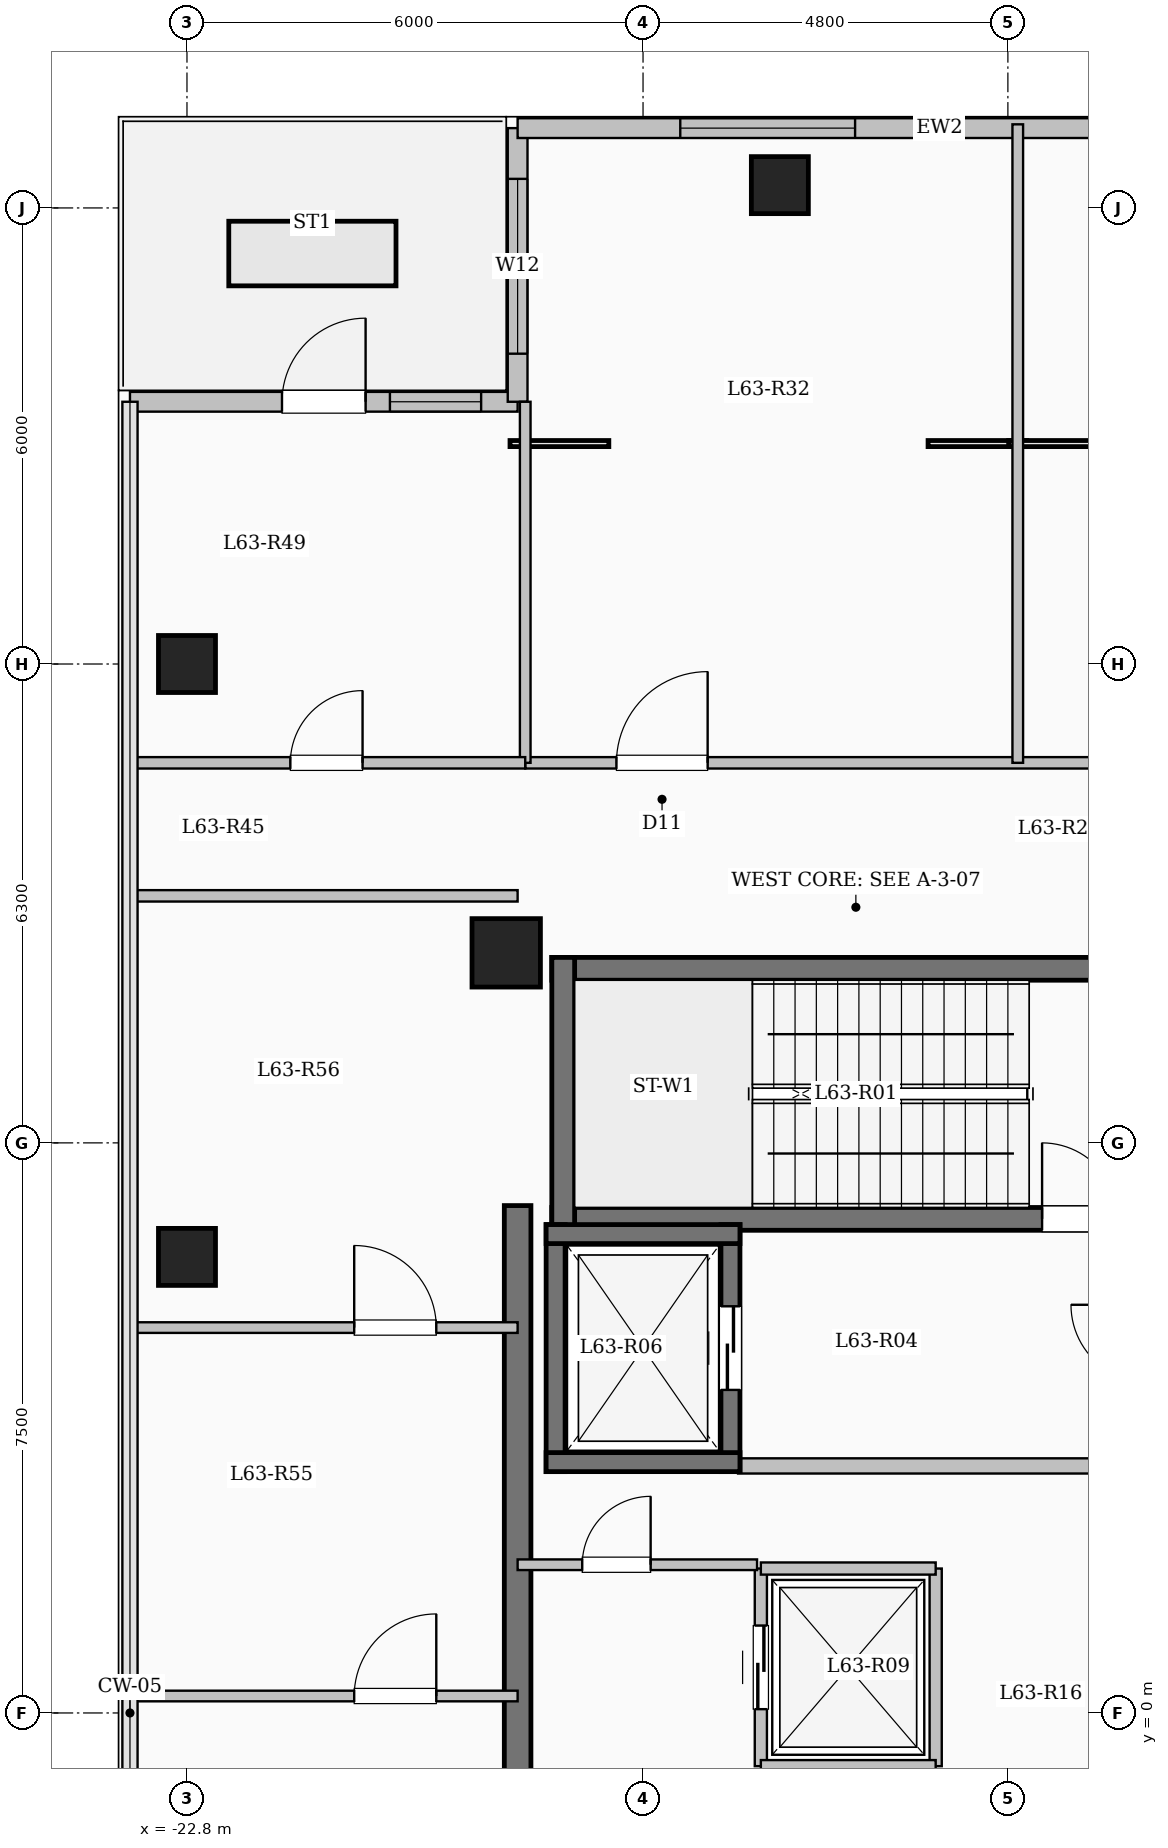
"""IFC4 building model, lengths in metres.
Left out: names, types, materials, properties, quantities, classifications, styles, units other than length and angle.
Written with IfcOpenShell. Run it as: python <this file> out.ifc"""

import sys

from ifc_helpers import new_model, si_unit, direction, frame, frame_2d, origin, origin_2d, place, context, subcontext, project, spatial, rectangle, extrude, element, fill, save


model = new_model("IFC4")
c1 = context("Model", 3, precision=1e-05, world=origin(), true_north=direction((0.0, 1.0)))
c2 = subcontext(c1, "Body", "Model", "MODEL_VIEW")
j1 = project(units=[si_unit("LENGTHUNIT", "METRE"), si_unit("PLANEANGLEUNIT", "RADIAN")], contexts=[c1])
p1 = place(None, origin())
s1 = spatial("IfcSite", under=j1, at=p1, CompositionType="ELEMENT")
p2 = place(p1, origin())
s2 = spatial("IfcBuilding", under=s1, at=p2, CompositionType="ELEMENT")
p3 = place(p2, frame((0.0, 0.0, 231.75)))
s3 = spatial("IfcBuildingStorey", under=s2, at=p3, CompositionType="ELEMENT", Elevation=231.75)
p4 = place(p3, frame((-18.6, 10.0, 0.0), z_axis=(0.0, 0.0, 1.0), x_axis=(1.0, 0.0, 0.0)))
e1 = element("IfcColumn", 1, at=p4, inside=s3, PredefinedType="COLUMN", context=c2, shape_type="SweptSolid", body=[
    extrude(rectangle(XDim=0.9, YDim=0.9, at=origin_2d()), origin(), (0.0, 0.0, 1.0), 4.65),
])
for number, where, z_axis, x_axis in (
    (2, (-15.0, 20.1, 0.0), (0.0, 0.0, 1.0), (1.0, 0.0, 0.0)),
    (3, (-22.8, 6.0, 0.0), (0.0, 0.0, 1.0), (1.0, 0.0, 0.0)),
    (4, (-22.8, 13.8, 0.0), (0.0, 0.0, 1.0), (1.0, 0.0, 0.0)),
):
    element("IfcColumn", number, at=place(p3, frame(where, z_axis=z_axis, x_axis=x_axis)), inside=s3, PredefinedType="COLUMN", context=c2, shape_type="SweptSolid", body=[
        extrude(rectangle(XDim=0.75, YDim=0.75, at=origin_2d()), origin(), (0.0, 0.0, 1.0), 4.65),
    ])
p5 = place(p3, frame((-23.55, 17.25, 0.0), z_axis=(0.0, 0.0, 1.0), x_axis=(1.0, 0.0, 0.0)))
e5 = element("IfcWall", 5, at=p5, inside=s3, PredefinedType="SOLIDWALL", context=c2, shape_type="SweptSolid", body=[
    extrude(rectangle(XDim=5.1, YDim=0.26, at=frame_2d((2.55, 0.0))), origin(), (0.0, 0.0, 1.0), 4.35),
])
p6 = place(p5, frame((2.0, 0.0, 0.0)))
e6 = element("IfcOpeningElement", 6, at=p6, cuts=e5, PredefinedType="OPENING", context=c2, shape_type="SweptSolid", body=[
    extrude(rectangle(XDim=1.1, YDim=2.2, at=frame_2d((0.55, 1.1))), frame((0.0, 0.14, 0.0), z_axis=(0.0, -1.0, 0.0), x_axis=(1.0, 0.0, 0.0)), (0.0, 0.0, 1.0), 0.28),
])
p7 = place(p5, frame((3.42, 0.0, 0.95)))
e7 = element("IfcOpeningElement", 7, at=p7, cuts=e5, PredefinedType="OPENING", context=c2, shape_type="SweptSolid", body=[
    extrude(rectangle(XDim=1.2, YDim=1.5, at=frame_2d((0.6, 0.75))), frame((0.0, 0.14, 0.0), z_axis=(0.0, -1.0, 0.0), x_axis=(1.0, 0.0, 0.0)), (0.0, 0.0, 1.0), 0.28),
])
p8 = place(p3, frame((-18.45, 17.25, 0.0), z_axis=(0.0, 0.0, 1.0), x_axis=(0.0, 1.0, 0.0)))
e8 = element("IfcWall", 8, at=p8, inside=s3, PredefinedType="SOLIDWALL", context=c2, shape_type="SweptSolid", body=[
    extrude(rectangle(XDim=3.6, YDim=0.26, at=frame_2d((1.8, 0.0))), origin(), (0.0, 0.0, 1.0), 4.35),
])
p9 = place(p8, frame((0.633, 0.0, 0.85)))
e9 = element("IfcOpeningElement", 9, at=p9, cuts=e8, PredefinedType="OPENING", context=c2, shape_type="SweptSolid", body=[
    extrude(rectangle(XDim=2.3, YDim=2.2, at=frame_2d((1.15, 1.1))), frame((0.0, 0.14, 0.0), z_axis=(0.0, -1.0, 0.0), x_axis=(1.0, 0.0, 0.0)), (0.0, 0.0, 1.0), 0.28),
])
p10 = place(p3, frame((-18.45, 20.85, 0.0), z_axis=(0.0, 0.0, 1.0), x_axis=(1.0, 0.0, 0.0)))
e10 = element("IfcWall", 10, at=p10, inside=s3, PredefinedType="SOLIDWALL", context=c2, shape_type="SweptSolid", body=[
    extrude(rectangle(XDim=11.1, YDim=0.26, at=frame_2d((5.55, 0.0))), origin(), (0.0, 0.0, 1.0), 4.35),
])
p11 = place(p10, frame((2.14, 0.0, 0.85)))
e11 = element("IfcOpeningElement", 11, at=p11, cuts=e10, PredefinedType="OPENING", context=c2, shape_type="SweptSolid", body=[
    extrude(rectangle(XDim=2.3, YDim=2.2, at=frame_2d((1.15, 1.1))), frame((0.0, 0.14, 0.0), z_axis=(0.0, -1.0, 0.0), x_axis=(1.0, 0.0, 0.0)), (0.0, 0.0, 1.0), 0.28),
])
p12 = place(p10, frame((7.765, 0.0, 0.85)))
e12 = element("IfcOpeningElement", 12, at=p12, cuts=e10, PredefinedType="OPENING", context=c2, shape_type="SweptSolid", body=[
    extrude(rectangle(XDim=2.3, YDim=2.2, at=frame_2d((1.15, 1.1))), frame((0.0, 0.14, 0.0), z_axis=(0.0, -1.0, 0.0), x_axis=(1.0, 0.0, 0.0)), (0.0, 0.0, 1.0), 0.28),
])
p13 = place(p3, frame((-18.0, 9.79, 0.0), z_axis=(0.0, 0.0, 1.0), x_axis=(1.0, 0.0, 0.0)))
e13 = element("IfcWall", 13, at=p13, inside=s3, PredefinedType="SHEAR", context=c2, shape_type="SweptSolid", body=[
    extrude(rectangle(XDim=8.0, YDim=0.3, at=frame_2d((4.0, 0.0))), origin(), (0.0, 0.0, 1.0), 4.65),
])
p14 = place(p3, frame((-18.0, 6.5, 0.0), z_axis=(0.0, 0.0, 1.0), x_axis=(1.0, 0.0, 0.0)))
e14 = element("IfcWall", 14, at=p14, inside=s3, PredefinedType="SHEAR", context=c2, shape_type="SweptSolid", body=[
    extrude(rectangle(XDim=8.0, YDim=0.3, at=frame_2d((4.0, 0.0))), origin(), (0.0, 0.0, 1.0), 4.65),
])
p15 = place(p14, frame((6.45, 0.0, 0.0)))
e15 = element("IfcOpeningElement", 15, at=p15, cuts=e14, PredefinedType="OPENING", context=c2, shape_type="SweptSolid", body=[
    extrude(rectangle(XDim=1.0, YDim=2.15, at=frame_2d((0.5, 1.075))), frame((0.0, 0.16, 0.0), z_axis=(0.0, -1.0, 0.0), x_axis=(1.0, 0.0, 0.0)), (0.0, 0.0, 1.0), 0.32),
])
p16 = place(p3, frame((-17.85, 6.35, 0.0), z_axis=(0.0, 0.0, 1.0), x_axis=(0.0, 1.0, 0.0)))
e16 = element("IfcWall", 16, at=p16, inside=s3, PredefinedType="SHEAR", context=c2, shape_type="SweptSolid", body=[
    extrude(rectangle(XDim=3.59, YDim=0.3, at=frame_2d((1.795, 0.0))), origin(), (0.0, 0.0, 1.0), 4.65),
])
p17 = place(p3, frame((-15.55, 3.25, 0.0), z_axis=(0.0, 0.0, 1.0), x_axis=(1.0, 0.0, 0.0)))
e17 = element("IfcWall", 17, at=p17, inside=s3, PredefinedType="SOLIDWALL", context=c2, shape_type="SweptSolid", body=[
    extrude(rectangle(XDim=5.4, YDim=0.2, at=frame_2d((2.7, 0.0))), origin(), (0.0, 0.0, 1.0), 4.35),
])
p18 = place(p3, frame((-17.95, 3.175, 0.0), z_axis=(0.0, 0.0, 1.0), x_axis=(0.0, 1.0, 0.0)))
e18 = element("IfcWall", 18, at=p18, inside=s3, PredefinedType="SHEAR", context=c2, shape_type="SweptSolid", body=[
    extrude(rectangle(XDim=3.25, YDim=0.25, at=frame_2d((1.625, 0.0))), origin(), (0.0, 0.0, 1.0), 4.65),
])
p19 = place(p3, frame((-15.65, 3.175, 0.0), z_axis=(0.0, 0.0, 1.0), x_axis=(0.0, 1.0, 0.0)))
e19 = element("IfcWall", 19, at=p19, inside=s3, PredefinedType="SHEAR", context=c2, shape_type="SweptSolid", body=[
    extrude(rectangle(XDim=3.25, YDim=0.25, at=frame_2d((1.625, 0.0))), origin(), (0.0, 0.0, 1.0), 4.65),
])
p20 = place(p19, frame((1.075, 0.0, 0.0)))
e20 = element("IfcOpeningElement", 20, at=p20, cuts=e19, PredefinedType="OPENING", context=c2, shape_type="SweptSolid", body=[
    extrude(rectangle(XDim=1.1, YDim=2.15, at=frame_2d((0.55, 1.075))), frame((0.0, 0.135, 0.0), z_axis=(0.0, -1.0, 0.0), x_axis=(1.0, 0.0, 0.0)), (0.0, 0.0, 1.0), 0.27),
])
for number, where, z_axis, x_axis in (
    (21, (-18.075, 3.3, 0.0), (0.0, 0.0, 1.0), (1.0, 0.0, 0.0)),
    (22, (-18.075, 6.3, 0.0), (0.0, 0.0, 1.0), (1.0, 0.0, 0.0)),
):
    element("IfcWall", number, at=place(p3, frame(where, z_axis=z_axis, x_axis=x_axis)), inside=s3, PredefinedType="SHEAR", context=c2, shape_type="SweptSolid", body=[
        extrude(rectangle(XDim=2.55, YDim=0.25, at=frame_2d((1.275, 0.0))), origin(), (0.0, 0.0, 1.0), 4.65),
    ])
p21 = place(p3, frame((-15.25, -0.7, 0.0), z_axis=(0.0, 0.0, 1.0), x_axis=(0.0, 1.0, 0.0)))
e23 = element("IfcWall", 23, at=p21, inside=s3, PredefinedType="SOLIDWALL", context=c2, shape_type="SweptSolid", body=[
    extrude(rectangle(XDim=2.6, YDim=0.16, at=frame_2d((1.3, 0.0))), origin(), (0.0, 0.0, 1.0), 4.35),
])
p22 = place(p21, frame((0.75, 0.0, 0.0)))
e24 = element("IfcOpeningElement", 24, at=p22, cuts=e23, PredefinedType="OPENING", context=c2, shape_type="SweptSolid", body=[
    extrude(rectangle(XDim=1.1, YDim=2.15, at=frame_2d((0.55, 1.075))), frame((0.0, 0.09, 0.0), z_axis=(0.0, -1.0, 0.0), x_axis=(1.0, 0.0, 0.0)), (0.0, 0.0, 1.0), 0.18),
])
p23 = place(p3, frame((-12.95, -0.7, 0.0), z_axis=(0.0, 0.0, 1.0), x_axis=(0.0, 1.0, 0.0)))
e25 = element("IfcWall", 25, at=p23, inside=s3, PredefinedType="SOLIDWALL", context=c2, shape_type="SweptSolid", body=[
    extrude(rectangle(XDim=2.6, YDim=0.16, at=frame_2d((1.3, 0.0))), origin(), (0.0, 0.0, 1.0), 4.35),
])
for number, where, z_axis, x_axis in (
    (26, (-15.25, -0.7, 0.0), (0.0, 0.0, 1.0), (1.0, 0.0, 0.0)),
    (27, (-15.25, 1.9, 0.0), (0.0, 0.0, 1.0), (1.0, 0.0, 0.0)),
):
    element("IfcWall", number, at=place(p3, frame(where, z_axis=z_axis, x_axis=x_axis)), inside=s3, PredefinedType="SOLIDWALL", context=c2, shape_type="SweptSolid", body=[
        extrude(rectangle(XDim=2.3, YDim=0.16, at=frame_2d((1.15, 0.0))), origin(), (0.0, 0.0, 1.0), 4.35),
    ])
p24 = place(p3, frame((-18.45, -7.375, 0.0), z_axis=(0.0, 0.0, 1.0), x_axis=(0.0, 1.0, 0.0)))
e28 = element("IfcWall", 28, at=p24, inside=s3, PredefinedType="SHEAR", context=c2, shape_type="SweptSolid", body=[
    extrude(rectangle(XDim=14.05, YDim=0.35, at=frame_2d((7.025, 0.0))), origin(), (0.0, 0.0, 1.0), 4.65),
])
p25 = place(p3, frame((-18.45, 1.95, 0.0), z_axis=(0.0, 0.0, 1.0), x_axis=(1.0, 0.0, 0.0)))
e29 = element("IfcWall", 29, at=p25, inside=s3, PredefinedType="PARTITIONING", context=c2, shape_type="SweptSolid", body=[
    extrude(rectangle(XDim=3.15, YDim=0.14, at=frame_2d((1.575, 0.0))), origin(), (0.0, 0.0, 1.0), 4.35),
])
p26 = place(p25, frame((0.85, 0.0, 0.0)))
e30 = element("IfcOpeningElement", 30, at=p26, cuts=e29, PredefinedType="OPENING", context=c2, shape_type="SweptSolid", body=[
    extrude(rectangle(XDim=0.9, YDim=2.08, at=frame_2d((0.45, 1.04))), frame((0.0, 0.08, 0.0), z_axis=(0.0, -1.0, 0.0), x_axis=(1.0, 0.0, 0.0)), (0.0, 0.0, 1.0), 0.16),
])
p27 = place(p3, frame((-18.35, 12.5, 0.0), z_axis=(0.0, 0.0, 1.0), x_axis=(1.0, 0.0, 0.0)))
e31 = element("IfcWall", 31, at=p27, inside=s3, PredefinedType="PARTITIONING", context=c2, shape_type="SweptSolid", body=[
    extrude(rectangle(XDim=14.5, YDim=0.15, at=frame_2d((7.25, 0.0))), origin(), (0.0, 0.0, 1.0), 4.35),
])
p28 = place(p27, frame((1.2, 0.0, 0.0)))
e32 = element("IfcOpeningElement", 32, at=p28, cuts=e31, PredefinedType="OPENING", context=c2, shape_type="SweptSolid", body=[
    extrude(rectangle(XDim=1.2, YDim=2.15, at=frame_2d((0.6, 1.075))), frame((0.0, 0.085, 0.0), z_axis=(0.0, -1.0, 0.0), x_axis=(1.0, 0.0, 0.0)), (0.0, 0.0, 1.0), 0.17),
])
p29 = place(p27, frame((7.58, 0.0, 0.0)))
e33 = element("IfcOpeningElement", 33, at=p29, cuts=e31, PredefinedType="OPENING", context=c2, shape_type="SweptSolid", body=[
    extrude(rectangle(XDim=1.08, YDim=2.15, at=frame_2d((0.54, 1.075))), frame((0.0, 0.085, 0.0), z_axis=(0.0, -1.0, 0.0), x_axis=(1.0, 0.0, 0.0)), (0.0, 0.0, 1.0), 0.17),
])
p30 = place(p3, frame((-11.87, 12.5, 0.0), z_axis=(0.0, 0.0, 1.0), x_axis=(0.0, 1.0, 0.0)))
e34 = element("IfcWall", 34, at=p30, inside=s3, PredefinedType="PARTITIONING", context=c2, shape_type="SweptSolid", body=[
    extrude(rectangle(XDim=8.4, YDim=0.14, at=frame_2d((4.2, 0.0))), origin(), (0.0, 0.0, 1.0), 4.35),
])
p31 = place(p3, frame((-23.58, 10.75, 0.0), z_axis=(0.0, 0.0, 1.0), x_axis=(1.0, 0.0, 0.0)))
e35 = element("IfcWall", 35, at=p31, inside=s3, PredefinedType="PARTITIONING", context=c2, shape_type="SweptSolid", body=[
    extrude(rectangle(XDim=5.13, YDim=0.15, at=frame_2d((2.565, 0.0))), origin(), (0.0, 0.0, 1.0), 4.35),
])
p32 = place(p3, frame((-18.35, 12.5, 0.0), z_axis=(0.0, 0.0, 1.0), x_axis=(0.0, 1.0, 0.0)))
e36 = element("IfcWall", 36, at=p32, inside=s3, PredefinedType="PARTITIONING", context=c2, shape_type="SweptSolid", body=[
    extrude(rectangle(XDim=4.75, YDim=0.14, at=frame_2d((2.375, 0.0))), origin(), (0.0, 0.0, 1.0), 4.35),
])
p33 = place(p3, frame((-23.58, 12.5, 0.0), z_axis=(0.0, 0.0, 1.0), x_axis=(1.0, 0.0, 0.0)))
e37 = element("IfcWall", 37, at=p33, inside=s3, PredefinedType="PARTITIONING", context=c2, shape_type="SweptSolid", body=[
    extrude(rectangle(XDim=5.23, YDim=0.15, at=frame_2d((2.615, 0.0))), origin(), (0.0, 0.0, 1.0), 4.35),
])
p34 = place(p33, frame((2.14, 0.0, 0.0)))
e38 = element("IfcOpeningElement", 38, at=p34, cuts=e37, PredefinedType="OPENING", context=c2, shape_type="SweptSolid", body=[
    extrude(rectangle(XDim=0.95, YDim=2.15, at=frame_2d((0.475, 1.075))), frame((0.0, 0.085, 0.0), z_axis=(0.0, -1.0, 0.0), x_axis=(1.0, 0.0, 0.0)), (0.0, 0.0, 1.0), 0.17),
])
p35 = place(p3, frame((-23.58, 0.223, 0.0), z_axis=(0.0, 0.0, 1.0), x_axis=(1.0, 0.0, 0.0)))
e39 = element("IfcWall", 39, at=p35, inside=s3, PredefinedType="PARTITIONING", context=c2, shape_type="SweptSolid", body=[
    extrude(rectangle(XDim=5.13, YDim=0.14, at=frame_2d((2.565, 0.0))), origin(), (0.0, 0.0, 1.0), 4.35),
])
p36 = place(p35, frame((2.98, 0.0, 0.0)))
e40 = element("IfcOpeningElement", 40, at=p36, cuts=e39, PredefinedType="OPENING", context=c2, shape_type="SweptSolid", body=[
    extrude(rectangle(XDim=1.08, YDim=2.15, at=frame_2d((0.54, 1.075))), frame((0.0, 0.08, 0.0), z_axis=(0.0, -1.0, 0.0), x_axis=(1.0, 0.0, 0.0)), (0.0, 0.0, 1.0), 0.16),
])
p37 = place(p3, frame((-23.58, 5.07, 0.0), z_axis=(0.0, 0.0, 1.0), x_axis=(1.0, 0.0, 0.0)))
e41 = element("IfcWall", 41, at=p37, inside=s3, PredefinedType="PARTITIONING", context=c2, shape_type="SweptSolid", body=[
    extrude(rectangle(XDim=5.13, YDim=0.14, at=frame_2d((2.565, 0.0))), origin(), (0.0, 0.0, 1.0), 4.35),
])
p38 = place(p37, frame((2.98, 0.0, 0.0)))
e42 = element("IfcOpeningElement", 42, at=p38, cuts=e41, PredefinedType="OPENING", context=c2, shape_type="SweptSolid", body=[
    extrude(rectangle(XDim=1.08, YDim=2.15, at=frame_2d((0.54, 1.075))), frame((0.0, 0.08, 0.0), z_axis=(0.0, -1.0, 0.0), x_axis=(1.0, 0.0, 0.0)), (0.0, 0.0, 1.0), 0.16),
])
p39 = place(p6, origin())
e43 = element("IfcDoor", 43, at=p39, inside=s3, OperationType="SINGLE_SWING_RIGHT", PredefinedType="DOOR", context=c2, shape_type="SweptSolid", body=[
    extrude(rectangle(XDim=1.1, YDim=2.2, at=frame_2d((0.55, 1.1))), frame((0.0, 0.025, 0.0), z_axis=(0.0, -1.0, 0.0), x_axis=(1.0, 0.0, 0.0)), (0.0, 0.0, 1.0), 0.05),
])
fill(e6, e43)
p40 = place(p7, origin())
e44 = element("IfcWindow", 44, at=p40, inside=s3, PartitioningType="SINGLE_PANEL", PredefinedType="WINDOW", context=c2, shape_type="SweptSolid", body=[
    extrude(rectangle(XDim=1.2, YDim=1.5, at=frame_2d((0.6, 0.75))), frame((0.0, 0.03, 0.0), z_axis=(0.0, -1.0, 0.0), x_axis=(1.0, 0.0, 0.0)), (0.0, 0.0, 1.0), 0.06),
])
fill(e7, e44)
p41 = place(p9, origin())
e45 = element("IfcWindow", 45, at=p41, inside=s3, PartitioningType="SINGLE_PANEL", PredefinedType="WINDOW", context=c2, shape_type="SweptSolid", body=[
    extrude(rectangle(XDim=2.3, YDim=2.2, at=frame_2d((1.15, 1.1))), frame((0.0, 0.03, 0.0), z_axis=(0.0, -1.0, 0.0), x_axis=(1.0, 0.0, 0.0)), (0.0, 0.0, 1.0), 0.06),
])
fill(e9, e45)
p42 = place(p11, origin())
e46 = element("IfcWindow", 46, at=p42, inside=s3, PartitioningType="SINGLE_PANEL", PredefinedType="WINDOW", context=c2, shape_type="SweptSolid", body=[
    extrude(rectangle(XDim=2.3, YDim=2.2, at=frame_2d((1.15, 1.1))), frame((0.0, 0.03, 0.0), z_axis=(0.0, -1.0, 0.0), x_axis=(1.0, 0.0, 0.0)), (0.0, 0.0, 1.0), 0.06),
])
fill(e11, e46)
p43 = place(p15, origin())
e47 = element("IfcDoor", 47, at=p43, inside=s3, OperationType="SINGLE_SWING_LEFT", PredefinedType="DOOR", context=c2, shape_type="SweptSolid", body=[
    extrude(rectangle(XDim=1.0, YDim=2.15, at=frame_2d((0.5, 1.075))), frame((0.0, 0.025, 0.0), z_axis=(0.0, -1.0, 0.0), x_axis=(1.0, 0.0, 0.0)), (0.0, 0.0, 1.0), 0.05),
])
fill(e15, e47)
p44 = place(p20, origin())
e48 = element("IfcDoor", 48, at=p44, inside=s3, OperationType="SLIDING_TO_LEFT", PredefinedType="DOOR", context=c2, shape_type="SweptSolid", body=[
    extrude(rectangle(XDim=1.1, YDim=2.15, at=frame_2d((0.55, 1.075))), frame((0.0, 0.025, 0.0), z_axis=(0.0, -1.0, 0.0), x_axis=(1.0, 0.0, 0.0)), (0.0, 0.0, 1.0), 0.05),
])
fill(e20, e48)
p45 = place(p22, origin())
e49 = element("IfcDoor", 49, at=p45, inside=s3, OperationType="SLIDING_TO_LEFT", PredefinedType="DOOR", context=c2, shape_type="SweptSolid", body=[
    extrude(rectangle(XDim=1.1, YDim=2.15, at=frame_2d((0.55, 1.075))), frame((0.0, 0.025, 0.0), z_axis=(0.0, -1.0, 0.0), x_axis=(1.0, 0.0, 0.0)), (0.0, 0.0, 1.0), 0.05),
])
fill(e24, e49)
p46 = place(p26, origin())
e50 = element("IfcDoor", 50, at=p46, inside=s3, OperationType="SINGLE_SWING_RIGHT", PredefinedType="DOOR", context=c2, shape_type="SweptSolid", body=[
    extrude(rectangle(XDim=0.9, YDim=2.08, at=frame_2d((0.45, 1.04))), frame((0.0, 0.025, 0.0), z_axis=(0.0, -1.0, 0.0), x_axis=(1.0, 0.0, 0.0)), (0.0, 0.0, 1.0), 0.05),
])
fill(e30, e50)
p47 = place(p28, origin())
e51 = element("IfcDoor", 51, at=p47, inside=s3, OperationType="SINGLE_SWING_RIGHT", PredefinedType="DOOR", context=c2, shape_type="SweptSolid", body=[
    extrude(rectangle(XDim=1.2, YDim=2.15, at=frame_2d((0.6, 1.075))), frame((0.0, 0.025, 0.0), z_axis=(0.0, -1.0, 0.0), x_axis=(1.0, 0.0, 0.0)), (0.0, 0.0, 1.0), 0.05),
])
fill(e32, e51)
p48 = place(p34, origin())
e52 = element("IfcDoor", 52, at=p48, inside=s3, OperationType="SINGLE_SWING_RIGHT", PredefinedType="DOOR", context=c2, shape_type="SweptSolid", body=[
    extrude(rectangle(XDim=0.95, YDim=2.15, at=frame_2d((0.475, 1.075))), frame((0.0, 0.025, 0.0), z_axis=(0.0, -1.0, 0.0), x_axis=(1.0, 0.0, 0.0)), (0.0, 0.0, 1.0), 0.05),
])
fill(e38, e52)
p49 = place(p36, origin())
e53 = element("IfcDoor", 53, at=p49, inside=s3, OperationType="SINGLE_SWING_RIGHT", PredefinedType="DOOR", context=c2, shape_type="SweptSolid", body=[
    extrude(rectangle(XDim=1.08, YDim=2.15, at=frame_2d((0.54, 1.075))), frame((0.0, 0.025, 0.0), z_axis=(0.0, -1.0, 0.0), x_axis=(1.0, 0.0, 0.0)), (0.0, 0.0, 1.0), 0.05),
])
fill(e40, e53)
p50 = place(p38, origin())
e54 = element("IfcDoor", 54, at=p50, inside=s3, OperationType="SINGLE_SWING_LEFT", PredefinedType="DOOR", context=c2, shape_type="SweptSolid", body=[
    extrude(rectangle(XDim=1.08, YDim=2.15, at=frame_2d((0.54, 1.075))), frame((0.0, 0.025, 0.0), z_axis=(0.0, -1.0, 0.0), x_axis=(1.0, 0.0, 0.0)), (0.0, 0.0, 1.0), 0.05),
])
fill(e42, e54)
save(model, sys.argv[1])
